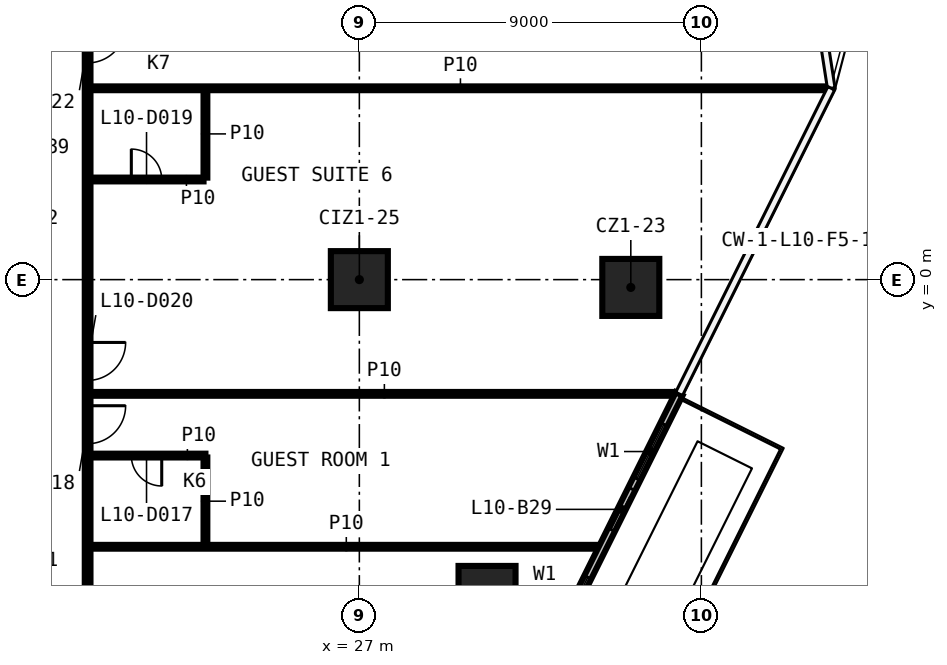
"""IFC4 building model, lengths in metres.
Left out: names, types, materials, properties, quantities, classifications, styles, units other than length and angle.
Written with IfcOpenShell. Run it as: python <this file> out.ifc"""

import sys

from ifc_helpers import new_model, si_unit, direction, frame, frame_2d, origin, origin_2d, place, context, subcontext, project, spatial, rectangle, extrude, element, fill, save


model = new_model("IFC4")
c1 = context("Model", 3, precision=1e-05, world=origin(), true_north=direction((0.0, 1.0)))
c2 = subcontext(c1, "Body", "Model", "MODEL_VIEW")
j1 = project(units=[si_unit("LENGTHUNIT", "METRE"), si_unit("PLANEANGLEUNIT", "RADIAN")], contexts=[c1])
p1 = place(None, origin())
s1 = spatial("IfcSite", under=j1, at=p1, CompositionType="ELEMENT")
p2 = place(p1, origin())
s2 = spatial("IfcBuilding", under=s1, at=p2, CompositionType="ELEMENT")
p3 = place(p2, frame((0.0, 0.0, 58.8)))
s3 = spatial("IfcBuildingStorey", under=s2, at=p3, CompositionType="ELEMENT", Elevation=58.8)
for number, where, z_axis, x_axis in (
    (1, (34.143, -0.205, 0.0), (0.0, 0.0, 1.0), (1.0, 0.0, 0.0)),
    (2, (30.36, -8.284, 0.0), (0.0, 0.0, 1.0), (1.0, 0.0, 0.0)),
    (3, (27.0, 0.0, 0.0), (0.0, 0.0, 1.0), (1.0, 0.0, 0.0)),
):
    element("IfcColumn", number, at=place(p3, frame(where, z_axis=z_axis, x_axis=x_axis)), inside=s3, PredefinedType="COLUMN", context=c2, shape_type="SweptSolid", body=[
        extrude(rectangle(XDim=1.5, YDim=1.5, at=origin_2d()), origin(), (0.0, 0.0, 1.0), 3.3),
    ])
p4 = place(p3, frame((19.925, -7.03, 0.0), z_axis=(0.0, 0.0, 1.0), x_axis=(1.0, 0.0, 0.0)))
e4 = element("IfcWall", 4, at=p4, inside=s3, PredefinedType="PARTITIONING", context=c2, shape_type="SweptSolid", body=[
    extrude(rectangle(XDim=13.464, YDim=0.1, at=frame_2d((6.732, 0.0))), origin(), (0.0, 0.0, 1.0), 3.3),
])
p5 = place(p3, frame((22.95, -4.63, 0.0), z_axis=(0.0, 0.0, 1.0), x_axis=(-1.0, 0.0, 0.0)))
e5 = element("IfcWall", 5, at=p5, inside=s3, PredefinedType="PARTITIONING", context=c2, shape_type="SweptSolid", body=[
    extrude(rectangle(XDim=3.025, YDim=0.1, at=frame_2d((1.512, 0.0))), origin(), (0.0, 0.0, 1.0), 3.3),
])
p6 = place(p5, frame((1.15, 0.0, 0.0)))
e6 = element("IfcOpeningElement", 6, at=p6, cuts=e5, PredefinedType="OPENING", context=c2, shape_type="SweptSolid", body=[
    extrude(rectangle(XDim=0.8, YDim=2.1, at=frame_2d((0.4, 1.05))), frame((0.0, 0.06, 0.0), z_axis=(0.0, -1.0, 0.0), x_axis=(1.0, 0.0, 0.0)), (0.0, 0.0, 1.0), 0.12),
])
p7 = place(p3, frame((19.925, -3.006, 0.0), z_axis=(0.0, 0.0, 1.0), x_axis=(1.0, 0.0, 0.0)))
e7 = element("IfcWall", 7, at=p7, inside=s3, PredefinedType="PARTITIONING", context=c2, shape_type="SweptSolid", body=[
    extrude(rectangle(XDim=15.467, YDim=0.1, at=frame_2d((7.733, 0.0))), origin(), (0.0, 0.0, 1.0), 3.3),
])
p8 = place(p3, frame((19.925, 2.635, 0.0), z_axis=(0.0, 0.0, 1.0), x_axis=(1.0, 0.0, 0.0)))
e8 = element("IfcWall", 8, at=p8, inside=s3, PredefinedType="PARTITIONING", context=c2, shape_type="SweptSolid", body=[
    extrude(rectangle(XDim=2.975, YDim=0.1, at=frame_2d((1.487, 0.0))), origin(), (0.0, 0.0, 1.0), 3.3),
])
p9 = place(p8, frame((1.075, 0.0, 0.0)))
e9 = element("IfcOpeningElement", 9, at=p9, cuts=e8, PredefinedType="OPENING", context=c2, shape_type="SweptSolid", body=[
    extrude(rectangle(XDim=0.8, YDim=2.1, at=frame_2d((0.4, 1.05))), frame((0.0, 0.06, 0.0), z_axis=(0.0, -1.0, 0.0), x_axis=(1.0, 0.0, 0.0)), (0.0, 0.0, 1.0), 0.12),
])
p10 = place(p3, frame((19.925, 5.035, 0.0), z_axis=(0.0, 0.0, 1.0), x_axis=(1.0, 0.0, 0.0)))
e10 = element("IfcWall", 10, at=p10, inside=s3, PredefinedType="PARTITIONING", context=c2, shape_type="SweptSolid", body=[
    extrude(rectangle(XDim=19.47, YDim=0.1, at=frame_2d((9.735, 0.0))), origin(), (0.0, 0.0, 1.0), 3.3),
])
p11 = place(p3, frame((22.95, -6.98, 0.0), z_axis=(0.0, 0.0, 1.0), x_axis=(0.0, 1.0, 0.0)))
e11 = element("IfcWall", 11, at=p11, inside=s3, PredefinedType="PARTITIONING", context=c2, shape_type="SweptSolid", body=[
    extrude(rectangle(XDim=2.3, YDim=0.1, at=frame_2d((1.15, 0.0))), origin(), (0.0, 0.0, 1.0), 3.3),
])
p12 = place(p3, frame((22.95, 2.685, 0.0), z_axis=(0.0, 0.0, 1.0), x_axis=(0.0, 1.0, 0.0)))
e12 = element("IfcWall", 12, at=p12, inside=s3, PredefinedType="PARTITIONING", context=c2, shape_type="SweptSolid", body=[
    extrude(rectangle(XDim=2.3, YDim=0.1, at=frame_2d((1.15, 0.0))), origin(), (0.0, 0.0, 1.0), 3.3),
])
p13 = place(p3, frame((19.85, 16.775, 0.0), z_axis=(0.0, 0.0, 1.0), x_axis=(0.0, -1.0, 0.0)))
e13 = element("IfcWall", 13, at=p13, inside=s3, PredefinedType="PARTITIONING", context=c2, shape_type="SweptSolid", body=[
    extrude(rectangle(XDim=33.55, YDim=0.15, at=frame_2d((16.775, 0.0))), origin(), (0.0, 0.0, 1.0), 3.3),
])
p14 = place(p13, frame((32.158, 0.0, 0.0)))
e14 = element("IfcOpeningElement", 14, at=p14, cuts=e13, PredefinedType="OPENING", context=c2, shape_type="SweptSolid", body=[
    extrude(rectangle(XDim=1.0, YDim=2.1, at=frame_2d((0.5, 1.05))), frame((0.0, 0.085, 0.0), z_axis=(0.0, -1.0, 0.0), x_axis=(1.0, 0.0, 0.0)), (0.0, 0.0, 1.0), 0.17),
])
p15 = place(p13, frame((20.094, 0.0, 0.0)))
e15 = element("IfcOpeningElement", 15, at=p15, cuts=e13, PredefinedType="OPENING", context=c2, shape_type="SweptSolid", body=[
    extrude(rectangle(XDim=1.0, YDim=2.1, at=frame_2d((0.5, 1.05))), frame((0.0, 0.085, 0.0), z_axis=(0.0, -1.0, 0.0), x_axis=(1.0, 0.0, 0.0)), (0.0, 0.0, 1.0), 0.17),
])
p16 = place(p13, frame((18.428, 0.0, 0.0)))
e16 = element("IfcOpeningElement", 16, at=p16, cuts=e13, PredefinedType="OPENING", context=c2, shape_type="SweptSolid", body=[
    extrude(rectangle(XDim=1.0, YDim=2.1, at=frame_2d((0.5, 1.05))), frame((0.0, 0.085, 0.0), z_axis=(0.0, -1.0, 0.0), x_axis=(1.0, 0.0, 0.0)), (0.0, 0.0, 1.0), 0.17),
])
p17 = place(p13, frame((10.072, 0.0, 0.0)))
e17 = element("IfcOpeningElement", 17, at=p17, cuts=e13, PredefinedType="OPENING", context=c2, shape_type="SweptSolid", body=[
    extrude(rectangle(XDim=1.0, YDim=2.1, at=frame_2d((0.5, 1.05))), frame((0.0, 0.085, 0.0), z_axis=(0.0, -1.0, 0.0), x_axis=(1.0, 0.0, 0.0)), (0.0, 0.0, 1.0), 0.17),
])
p18 = place(p13, frame((3.156, 0.0, 0.0)))
e18 = element("IfcOpeningElement", 18, at=p18, cuts=e13, PredefinedType="OPENING", context=c2, shape_type="SweptSolid", body=[
    extrude(rectangle(XDim=1.0, YDim=2.1, at=frame_2d((0.5, 1.05))), frame((0.0, 0.085, 0.0), z_axis=(0.0, -1.0, 0.0), x_axis=(1.0, 0.0, 0.0)), (0.0, 0.0, 1.0), 0.17),
])
p19 = place(p3, frame((21.391, -31.175, 0.0), z_axis=(0.0, 0.0, 1.0), x_axis=(0.445673586032, 0.895195539932, 0.0)))
e19 = element("IfcWall", 19, at=p19, inside=s3, PredefinedType="SOLIDWALL", context=c2, shape_type="SweptSolid", body=[
    extrude(rectangle(XDim=31.466, YDim=0.2, at=frame_2d((15.733, 0.0))), origin(), (0.0, 0.0, 1.0), 3.3),
])
p20 = place(p19, frame((2.0, 0.0, 0.6)))
e20 = element("IfcOpeningElement", 20, at=p20, cuts=e19, PredefinedType="OPENING", context=c2, shape_type="SweptSolid", body=[
    extrude(rectangle(XDim=1.6, YDim=2.4, at=frame_2d((0.8, 1.2))), frame((0.0, 0.11, 0.0), z_axis=(0.0, -1.0, 0.0), x_axis=(1.0, 0.0, 0.0)), (0.0, 0.0, 1.0), 0.22),
])
p21 = place(p19, frame((0.5, 0.0, 0.0)))
e21 = element("IfcOpeningElement", 21, at=p21, cuts=e19, PredefinedType="OPENING", context=c2, shape_type="SweptSolid", body=[
    extrude(rectangle(XDim=1.2, YDim=2.4, at=frame_2d((0.6, 1.2))), frame((0.0, 0.11, 0.0), z_axis=(0.0, -1.0, 0.0), x_axis=(1.0, 0.0, 0.0)), (0.0, 0.0, 1.0), 0.22),
])
p22 = place(p19, frame((4.995, 0.0, 0.6)))
e22 = element("IfcOpeningElement", 22, at=p22, cuts=e19, PredefinedType="OPENING", context=c2, shape_type="SweptSolid", body=[
    extrude(rectangle(XDim=1.6, YDim=2.4, at=frame_2d((0.8, 1.2))), frame((0.0, 0.11, 0.0), z_axis=(0.0, -1.0, 0.0), x_axis=(1.0, 0.0, 0.0)), (0.0, 0.0, 1.0), 0.22),
])
p23 = place(p19, frame((7.495, 0.0, 0.0)))
e23 = element("IfcOpeningElement", 23, at=p23, cuts=e19, PredefinedType="OPENING", context=c2, shape_type="SweptSolid", body=[
    extrude(rectangle(XDim=1.2, YDim=2.4, at=frame_2d((0.6, 1.2))), frame((0.0, 0.11, 0.0), z_axis=(0.0, -1.0, 0.0), x_axis=(1.0, 0.0, 0.0)), (0.0, 0.0, 1.0), 0.22),
])
p24 = place(p19, frame((10.99, 0.0, 0.6)))
e24 = element("IfcOpeningElement", 24, at=p24, cuts=e19, PredefinedType="OPENING", context=c2, shape_type="SweptSolid", body=[
    extrude(rectangle(XDim=1.6, YDim=2.4, at=frame_2d((0.8, 1.2))), frame((0.0, 0.11, 0.0), z_axis=(0.0, -1.0, 0.0), x_axis=(1.0, 0.0, 0.0)), (0.0, 0.0, 1.0), 0.22),
])
p25 = place(p19, frame((9.49, 0.0, 0.0)))
e25 = element("IfcOpeningElement", 25, at=p25, cuts=e19, PredefinedType="OPENING", context=c2, shape_type="SweptSolid", body=[
    extrude(rectangle(XDim=1.2, YDim=2.4, at=frame_2d((0.6, 1.2))), frame((0.0, 0.11, 0.0), z_axis=(0.0, -1.0, 0.0), x_axis=(1.0, 0.0, 0.0)), (0.0, 0.0, 1.0), 0.22),
])
p26 = place(p19, frame((13.986, 0.0, 0.6)))
e26 = element("IfcOpeningElement", 26, at=p26, cuts=e19, PredefinedType="OPENING", context=c2, shape_type="SweptSolid", body=[
    extrude(rectangle(XDim=1.6, YDim=2.4, at=frame_2d((0.8, 1.2))), frame((0.0, 0.11, 0.0), z_axis=(0.0, -1.0, 0.0), x_axis=(1.0, 0.0, 0.0)), (0.0, 0.0, 1.0), 0.22),
])
p27 = place(p19, frame((16.085, 0.0, 0.0)))
e27 = element("IfcOpeningElement", 27, at=p27, cuts=e19, PredefinedType="OPENING", context=c2, shape_type="SweptSolid", body=[
    extrude(rectangle(XDim=1.2, YDim=2.4, at=frame_2d((0.6, 1.2))), frame((0.0, 0.11, 0.0), z_axis=(0.0, -1.0, 0.0), x_axis=(1.0, 0.0, 0.0)), (0.0, 0.0, 1.0), 0.22),
])
p28 = place(p19, frame((19.981, 0.0, 0.6)))
e28 = element("IfcOpeningElement", 28, at=p28, cuts=e19, PredefinedType="OPENING", context=c2, shape_type="SweptSolid", body=[
    extrude(rectangle(XDim=1.6, YDim=2.4, at=frame_2d((0.8, 1.2))), frame((0.0, 0.11, 0.0), z_axis=(0.0, -1.0, 0.0), x_axis=(1.0, 0.0, 0.0)), (0.0, 0.0, 1.0), 0.22),
])
p29 = place(p19, frame((18.481, 0.0, 0.0)))
e29 = element("IfcOpeningElement", 29, at=p29, cuts=e19, PredefinedType="OPENING", context=c2, shape_type="SweptSolid", body=[
    extrude(rectangle(XDim=1.2, YDim=2.4, at=frame_2d((0.6, 1.2))), frame((0.0, 0.11, 0.0), z_axis=(0.0, -1.0, 0.0), x_axis=(1.0, 0.0, 0.0)), (0.0, 0.0, 1.0), 0.22),
])
p30 = place(p19, frame((24.476, 0.0, 0.6)))
e30 = element("IfcOpeningElement", 30, at=p30, cuts=e19, PredefinedType="OPENING", context=c2, shape_type="SweptSolid", body=[
    extrude(rectangle(XDim=1.6, YDim=2.4, at=frame_2d((0.8, 1.2))), frame((0.0, 0.11, 0.0), z_axis=(0.0, -1.0, 0.0), x_axis=(1.0, 0.0, 0.0)), (0.0, 0.0, 1.0), 0.22),
])
p31 = place(p19, frame((22.776, 0.0, 0.0)))
e31 = element("IfcOpeningElement", 31, at=p31, cuts=e19, PredefinedType="OPENING", context=c2, shape_type="SweptSolid", body=[
    extrude(rectangle(XDim=1.2, YDim=2.4, at=frame_2d((0.6, 1.2))), frame((0.0, 0.11, 0.0), z_axis=(0.0, -1.0, 0.0), x_axis=(1.0, 0.0, 0.0)), (0.0, 0.0, 1.0), 0.22),
])
p32 = place(p19, frame((28.971, 0.0, 0.6)))
e32 = element("IfcOpeningElement", 32, at=p32, cuts=e19, PredefinedType="OPENING", context=c2, shape_type="SweptSolid", body=[
    extrude(rectangle(XDim=1.6, YDim=2.4, at=frame_2d((0.8, 1.2))), frame((0.0, 0.11, 0.0), z_axis=(0.0, -1.0, 0.0), x_axis=(1.0, 0.0, 0.0)), (0.0, 0.0, 1.0), 0.22),
])
p33 = place(p19, frame((27.471, 0.0, 0.0)))
e33 = element("IfcOpeningElement", 33, at=p33, cuts=e19, PredefinedType="OPENING", context=c2, shape_type="SweptSolid", body=[
    extrude(rectangle(XDim=1.2, YDim=2.4, at=frame_2d((0.6, 1.2))), frame((0.0, 0.11, 0.0), z_axis=(0.0, -1.0, 0.0), x_axis=(1.0, 0.0, 0.0)), (0.0, 0.0, 1.0), 0.22),
])
p34 = place(p6, origin())
e34 = element("IfcDoor", 34, at=p34, inside=s3, OperationType="SINGLE_SWING_LEFT", PredefinedType="DOOR", context=c2, shape_type="SweptSolid", body=[
    extrude(rectangle(XDim=0.8, YDim=2.1, at=frame_2d((0.4, 1.05))), frame((0.0, 0.025, 0.0), z_axis=(0.0, -1.0, 0.0), x_axis=(1.0, 0.0, 0.0)), (0.0, 0.0, 1.0), 0.05),
])
fill(e6, e34)
p35 = place(p15, origin())
e35 = element("IfcDoor", 35, at=p35, inside=s3, OperationType="SINGLE_SWING_RIGHT", PredefinedType="DOOR", context=c2, shape_type="SweptSolid", body=[
    extrude(rectangle(XDim=1.0, YDim=2.1, at=frame_2d((0.5, 1.05))), frame((0.0, 0.025, 0.0), z_axis=(0.0, -1.0, 0.0), x_axis=(1.0, 0.0, 0.0)), (0.0, 0.0, 1.0), 0.05),
])
fill(e15, e35)
p36 = place(p9, origin())
e36 = element("IfcDoor", 36, at=p36, inside=s3, OperationType="SINGLE_SWING_RIGHT", PredefinedType="DOOR", context=c2, shape_type="SweptSolid", body=[
    extrude(rectangle(XDim=0.8, YDim=2.1, at=frame_2d((0.4, 1.05))), frame((0.0, 0.025, 0.0), z_axis=(0.0, -1.0, 0.0), x_axis=(1.0, 0.0, 0.0)), (0.0, 0.0, 1.0), 0.05),
])
fill(e9, e36)
p37 = place(p16, origin())
e37 = element("IfcDoor", 37, at=p37, inside=s3, OperationType="SINGLE_SWING_LEFT", PredefinedType="DOOR", context=c2, shape_type="SweptSolid", body=[
    extrude(rectangle(XDim=1.0, YDim=2.1, at=frame_2d((0.5, 1.05))), frame((0.0, 0.025, 0.0), z_axis=(0.0, -1.0, 0.0), x_axis=(1.0, 0.0, 0.0)), (0.0, 0.0, 1.0), 0.05),
])
fill(e16, e37)
p38 = place(p17, origin())
e38 = element("IfcDoor", 38, at=p38, inside=s3, OperationType="SINGLE_SWING_RIGHT", PredefinedType="DOOR", context=c2, shape_type="SweptSolid", body=[
    extrude(rectangle(XDim=1.0, YDim=2.1, at=frame_2d((0.5, 1.05))), frame((0.0, 0.025, 0.0), z_axis=(0.0, -1.0, 0.0), x_axis=(1.0, 0.0, 0.0)), (0.0, 0.0, 1.0), 0.05),
])
fill(e17, e38)
p39 = place(p30, origin())
e39 = element("IfcWindow", 39, at=p39, inside=s3, PartitioningType="SINGLE_PANEL", PredefinedType="WINDOW", context=c2, shape_type="SweptSolid", body=[
    extrude(rectangle(XDim=1.6, YDim=2.4, at=frame_2d((0.8, 1.2))), frame((0.0, 0.03, 0.0), z_axis=(0.0, -1.0, 0.0), x_axis=(1.0, 0.0, 0.0)), (0.0, 0.0, 1.0), 0.06),
])
fill(e30, e39)
p40 = place(p32, origin())
e40 = element("IfcWindow", 40, at=p40, inside=s3, PartitioningType="SINGLE_PANEL", PredefinedType="WINDOW", context=c2, shape_type="SweptSolid", body=[
    extrude(rectangle(XDim=1.6, YDim=2.4, at=frame_2d((0.8, 1.2))), frame((0.0, 0.03, 0.0), z_axis=(0.0, -1.0, 0.0), x_axis=(1.0, 0.0, 0.0)), (0.0, 0.0, 1.0), 0.06),
])
fill(e32, e40)
p41 = place(p33, origin())
e41 = element("IfcDoor", 41, at=p41, inside=s3, OperationType="SLIDING_TO_LEFT", PredefinedType="DOOR", context=c2, shape_type="SweptSolid", body=[
    extrude(rectangle(XDim=1.2, YDim=2.4, at=frame_2d((0.6, 1.2))), frame((0.0, 0.025, 0.0), z_axis=(0.0, -1.0, 0.0), x_axis=(1.0, 0.0, 0.0)), (0.0, 0.0, 1.0), 0.05),
])
fill(e33, e41)
save(model, sys.argv[1])
